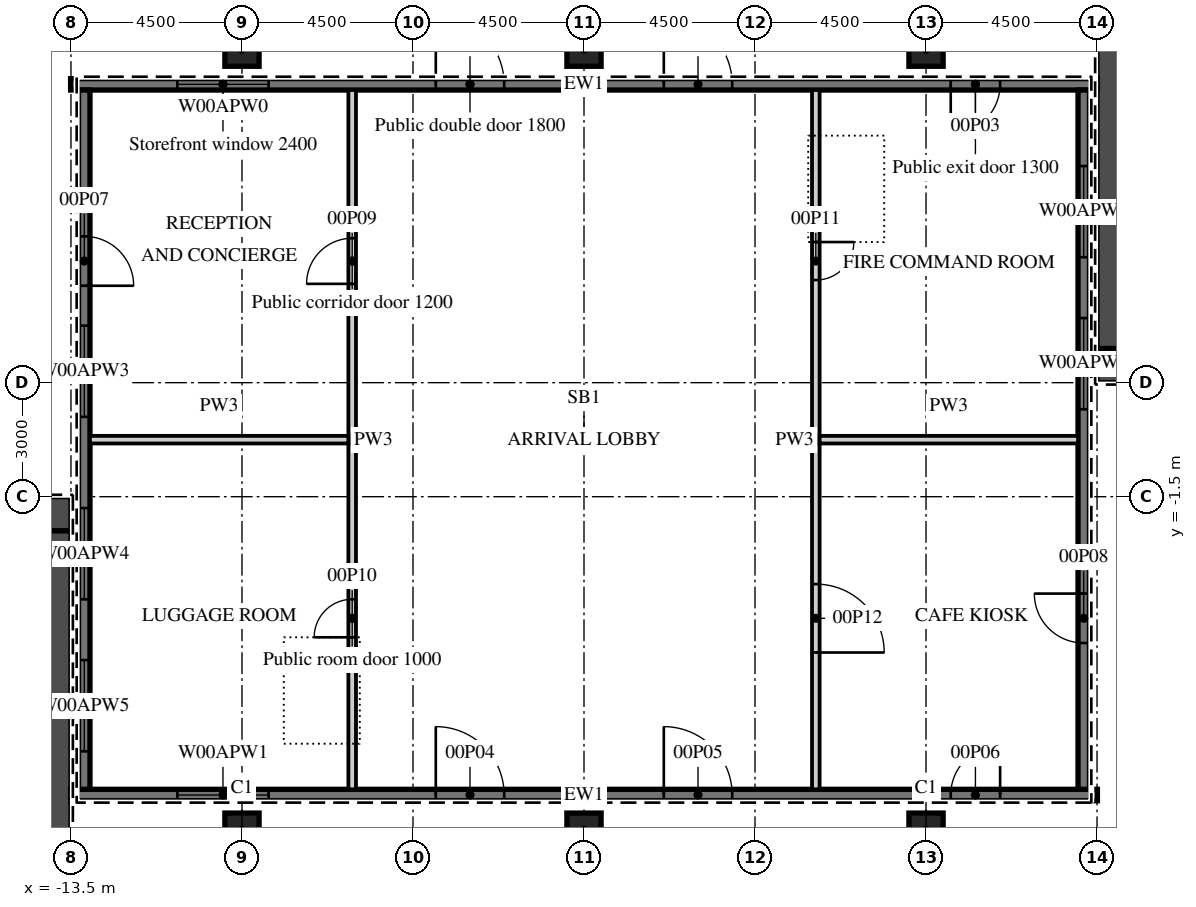
"""IFC4 building model, lengths in metres.
Left out: names, types, materials, properties, quantities, classifications, styles, units other than length and angle.
Written with IfcOpenShell. Run it as: python <this file> out.ifc"""

import sys

from ifc_helpers import new_model, si_unit, direction, frame, frame_2d, origin, origin_2d, place, context, subcontext, project, spatial, rectangle, extrude, element, fill, save


model = new_model("IFC4")
c1 = context("Model", 3, precision=1e-05, world=origin(), true_north=direction((0.0, 1.0)))
c2 = subcontext(c1, "Body", "Model", "MODEL_VIEW")
j1 = project(units=[si_unit("LENGTHUNIT", "METRE"), si_unit("PLANEANGLEUNIT", "RADIAN")], contexts=[c1])
p1 = place(None, origin())
s1 = spatial("IfcSite", under=j1, at=p1, CompositionType="ELEMENT")
p2 = place(p1, origin())
s2 = spatial("IfcBuilding", under=s1, at=p2, CompositionType="ELEMENT")
p3 = place(p2, origin())
s3 = spatial("IfcBuildingStorey", under=s2, at=p3, CompositionType="ELEMENT", Elevation=0.0)
for number, where, z_axis, x_axis in (
    (1, (-9.0, -10.275, -0.5), (0.0, 0.0, 1.0), (1.0, 0.0, 0.0)),
    (2, (-9.0, 10.275, -0.5), (0.0, 0.0, 1.0), (1.0, 0.0, 0.0)),
    (3, (0.0, -10.275, -0.5), (0.0, 0.0, 1.0), (1.0, 0.0, 0.0)),
    (4, (0.0, 10.275, -0.5), (0.0, 0.0, 1.0), (1.0, 0.0, 0.0)),
    (5, (9.0, -10.275, -0.5), (0.0, 0.0, 1.0), (1.0, 0.0, 0.0)),
    (6, (9.0, 10.275, -0.5), (0.0, 0.0, 1.0), (1.0, 0.0, 0.0)),
):
    element("IfcColumn", number, at=place(p3, frame(where, z_axis=z_axis, x_axis=x_axis)), inside=s3, PredefinedType="COLUMN", context=c2, shape_type="SweptSolid", body=[
        extrude(rectangle(XDim=0.9, YDim=0.9, at=origin_2d()), origin(), (0.0, 0.0, 1.0), 11.5),
    ])
p4 = place(p3, frame((-31.5, -1.95, 0.0), z_axis=(0.0, 0.0, 1.0), x_axis=(1.0, 0.0, 0.0)))
e7 = element("IfcWall", 7, at=p4, inside=s3, PredefinedType="SHEAR", context=c2, shape_type="SweptSolid", body=[
    extrude(rectangle(XDim=18.0, YDim=0.9, at=frame_2d((9.0, 0.0))), origin(), (0.0, 0.0, 1.0), 10.55),
])
p5 = place(p4, frame((14.725, 0.0, 0.0)))
e8 = element("IfcOpeningElement", 8, at=p5, cuts=e7, PredefinedType="OPENING", context=c2, shape_type="SweptSolid", body=[
    extrude(rectangle(XDim=1.8, YDim=2.1, at=frame_2d((0.9, 1.05))), frame((0.0, 0.46, 0.0), z_axis=(0.0, -1.0, 0.0), x_axis=(1.0, 0.0, 0.0)), (0.0, 0.0, 1.0), 0.92),
])
p6 = place(p3, frame((-13.95, -14.6, 0.0), z_axis=(0.0, 0.0, 1.0), x_axis=(0.0, 1.0, 0.0)))
e9 = element("IfcWall", 9, at=p6, inside=s3, PredefinedType="SHEAR", context=c2, shape_type="SweptSolid", body=[
    extrude(rectangle(XDim=12.2, YDim=0.9, at=frame_2d((6.1, 0.0))), origin(), (0.0, 0.0, 1.0), 10.55),
])
p7 = place(p3, frame((13.5, 1.95, 0.0), z_axis=(0.0, 0.0, 1.0), x_axis=(1.0, 0.0, 0.0)))
e10 = element("IfcWall", 10, at=p7, inside=s3, PredefinedType="SHEAR", context=c2, shape_type="SweptSolid", body=[
    extrude(rectangle(XDim=18.0, YDim=0.9, at=frame_2d((9.0, 0.0))), origin(), (0.0, 0.0, 1.0), 10.55),
])
p8 = place(p7, frame((1.475, 0.0, 0.0)))
e11 = element("IfcOpeningElement", 11, at=p8, cuts=e10, PredefinedType="OPENING", context=c2, shape_type="SweptSolid", body=[
    extrude(rectangle(XDim=1.8, YDim=2.1, at=frame_2d((0.9, 1.05))), frame((0.0, 0.46, 0.0), z_axis=(0.0, -1.0, 0.0), x_axis=(1.0, 0.0, 0.0)), (0.0, 0.0, 1.0), 0.92),
])
p9 = place(p3, frame((13.95, 2.4, 0.0), z_axis=(0.0, 0.0, 1.0), x_axis=(0.0, 1.0, 0.0)))
e12 = element("IfcWall", 12, at=p9, inside=s3, PredefinedType="SHEAR", context=c2, shape_type="SweptSolid", body=[
    extrude(rectangle(XDim=12.2, YDim=0.9, at=frame_2d((6.1, 0.0))), origin(), (0.0, 0.0, 1.0), 10.55),
])
p10 = place(p3, frame((-13.51, 9.35, 0.0), z_axis=(0.0, 0.0, 1.0), x_axis=(1.0, 0.0, 0.0)))
e13 = element("IfcWall", 13, at=p10, inside=s3, PredefinedType="SOLIDWALL", context=c2, shape_type="SweptSolid", body=[
    extrude(rectangle(XDim=27.02, YDim=0.3, at=frame_2d((13.51, 0.0))), origin(), (0.0, 0.0, 1.0), 10.55),
])
p11 = place(p10, frame((9.61, 0.0, 0.0)))
e14 = element("IfcOpeningElement", 14, at=p11, cuts=e13, PredefinedType="OPENING", context=c2, shape_type="SweptSolid", body=[
    extrude(rectangle(XDim=1.8, YDim=2.1, at=frame_2d((0.9, 1.05))), frame((0.0, 0.16, 0.0), z_axis=(0.0, -1.0, 0.0), x_axis=(1.0, 0.0, 0.0)), (0.0, 0.0, 1.0), 0.32),
])
p12 = place(p10, frame((15.61, 0.0, 0.0)))
e15 = element("IfcOpeningElement", 15, at=p12, cuts=e13, PredefinedType="OPENING", context=c2, shape_type="SweptSolid", body=[
    extrude(rectangle(XDim=1.8, YDim=2.1, at=frame_2d((0.9, 1.05))), frame((0.0, 0.16, 0.0), z_axis=(0.0, -1.0, 0.0), x_axis=(1.0, 0.0, 0.0)), (0.0, 0.0, 1.0), 0.32),
])
p13 = place(p10, frame((23.16, 0.0, 0.0)))
e16 = element("IfcOpeningElement", 16, at=p13, cuts=e13, PredefinedType="OPENING", context=c2, shape_type="SweptSolid", body=[
    extrude(rectangle(XDim=1.3, YDim=2.1, at=frame_2d((0.65, 1.05))), frame((0.0, 0.16, 0.0), z_axis=(0.0, -1.0, 0.0), x_axis=(1.0, 0.0, 0.0)), (0.0, 0.0, 1.0), 0.32),
])
p14 = place(p10, frame((2.81, 0.0, 0.2)))
e17 = element("IfcOpeningElement", 17, at=p14, cuts=e13, PredefinedType="OPENING", context=c2, shape_type="SweptSolid", body=[
    extrude(rectangle(XDim=2.4, YDim=3.2, at=frame_2d((1.2, 1.6))), frame((0.0, 0.16, 0.0), z_axis=(0.0, -1.0, 0.0), x_axis=(1.0, 0.0, 0.0)), (0.0, 0.0, 1.0), 0.32),
])
p15 = place(p3, frame((-13.51, -9.35, 0.0), z_axis=(0.0, 0.0, 1.0), x_axis=(1.0, 0.0, 0.0)))
e18 = element("IfcWall", 18, at=p15, inside=s3, PredefinedType="SOLIDWALL", context=c2, shape_type="SweptSolid", body=[
    extrude(rectangle(XDim=27.02, YDim=0.3, at=frame_2d((13.51, 0.0))), origin(), (0.0, 0.0, 1.0), 10.55),
])
p16 = place(p15, frame((9.61, 0.0, 0.0)))
e19 = element("IfcOpeningElement", 19, at=p16, cuts=e18, PredefinedType="OPENING", context=c2, shape_type="SweptSolid", body=[
    extrude(rectangle(XDim=1.8, YDim=2.1, at=frame_2d((0.9, 1.05))), frame((0.0, 0.16, 0.0), z_axis=(0.0, -1.0, 0.0), x_axis=(1.0, 0.0, 0.0)), (0.0, 0.0, 1.0), 0.32),
])
p17 = place(p15, frame((15.61, 0.0, 0.0)))
e20 = element("IfcOpeningElement", 20, at=p17, cuts=e18, PredefinedType="OPENING", context=c2, shape_type="SweptSolid", body=[
    extrude(rectangle(XDim=1.8, YDim=2.1, at=frame_2d((0.9, 1.05))), frame((0.0, 0.16, 0.0), z_axis=(0.0, -1.0, 0.0), x_axis=(1.0, 0.0, 0.0)), (0.0, 0.0, 1.0), 0.32),
])
p18 = place(p15, frame((23.16, 0.0, 0.0)))
e21 = element("IfcOpeningElement", 21, at=p18, cuts=e18, PredefinedType="OPENING", context=c2, shape_type="SweptSolid", body=[
    extrude(rectangle(XDim=1.3, YDim=2.1, at=frame_2d((0.65, 1.05))), frame((0.0, 0.16, 0.0), z_axis=(0.0, -1.0, 0.0), x_axis=(1.0, 0.0, 0.0)), (0.0, 0.0, 1.0), 0.32),
])
p19 = place(p15, frame((2.81, 0.0, 0.2)))
e22 = element("IfcOpeningElement", 22, at=p19, cuts=e18, PredefinedType="OPENING", context=c2, shape_type="SweptSolid", body=[
    extrude(rectangle(XDim=2.4, YDim=3.2, at=frame_2d((1.2, 1.6))), frame((0.0, 0.16, 0.0), z_axis=(0.0, -1.0, 0.0), x_axis=(1.0, 0.0, 0.0)), (0.0, 0.0, 1.0), 0.32),
])
p20 = place(p3, frame((-13.15, -9.2, 0.0), z_axis=(0.0, 0.0, 1.0), x_axis=(0.0, 1.0, 0.0)))
e23 = element("IfcWall", 23, at=p20, inside=s3, PredefinedType="SOLIDWALL", context=c2, shape_type="SweptSolid", body=[
    extrude(rectangle(XDim=18.4, YDim=0.3, at=frame_2d((9.2, 0.0))), origin(), (0.0, 0.0, 1.0), 10.55),
])
p21 = place(p20, frame((13.25, 0.0, 0.0)))
e24 = element("IfcOpeningElement", 24, at=p21, cuts=e23, PredefinedType="OPENING", context=c2, shape_type="SweptSolid", body=[
    extrude(rectangle(XDim=1.3, YDim=2.1, at=frame_2d((0.65, 1.05))), frame((0.0, 0.16, 0.0), z_axis=(0.0, -1.0, 0.0), x_axis=(1.0, 0.0, 0.0)), (0.0, 0.0, 1.0), 0.32),
])
p22 = place(p20, frame((9.8, 0.0, 0.2)))
e25 = element("IfcOpeningElement", 25, at=p22, cuts=e23, PredefinedType="OPENING", context=c2, shape_type="SweptSolid", body=[
    extrude(rectangle(XDim=2.4, YDim=3.2, at=frame_2d((1.2, 1.6))), frame((0.0, 0.16, 0.0), z_axis=(0.0, -1.0, 0.0), x_axis=(1.0, 0.0, 0.0)), (0.0, 0.0, 1.0), 0.32),
])
p23 = place(p20, frame((5.0, 0.0, 0.2)))
e26 = element("IfcOpeningElement", 26, at=p23, cuts=e23, PredefinedType="OPENING", context=c2, shape_type="SweptSolid", body=[
    extrude(rectangle(XDim=2.4, YDim=3.2, at=frame_2d((1.2, 1.6))), frame((0.0, 0.16, 0.0), z_axis=(0.0, -1.0, 0.0), x_axis=(1.0, 0.0, 0.0)), (0.0, 0.0, 1.0), 0.32),
])
p24 = place(p20, frame((1.0, 0.0, 0.2)))
e27 = element("IfcOpeningElement", 27, at=p24, cuts=e23, PredefinedType="OPENING", context=c2, shape_type="SweptSolid", body=[
    extrude(rectangle(XDim=2.4, YDim=3.2, at=frame_2d((1.2, 1.6))), frame((0.0, 0.16, 0.0), z_axis=(0.0, -1.0, 0.0), x_axis=(1.0, 0.0, 0.0)), (0.0, 0.0, 1.0), 0.32),
])
p25 = place(p3, frame((13.15, -9.2, 0.0), z_axis=(0.0, 0.0, 1.0), x_axis=(0.0, 1.0, 0.0)))
e28 = element("IfcWall", 28, at=p25, inside=s3, PredefinedType="SOLIDWALL", context=c2, shape_type="SweptSolid", body=[
    extrude(rectangle(XDim=18.4, YDim=0.3, at=frame_2d((9.2, 0.0))), origin(), (0.0, 0.0, 1.0), 10.55),
])
p26 = place(p25, frame((3.85, 0.0, 0.0)))
e29 = element("IfcOpeningElement", 29, at=p26, cuts=e28, PredefinedType="OPENING", context=c2, shape_type="SweptSolid", body=[
    extrude(rectangle(XDim=1.3, YDim=2.1, at=frame_2d((0.65, 1.05))), frame((0.0, 0.16, 0.0), z_axis=(0.0, -1.0, 0.0), x_axis=(1.0, 0.0, 0.0)), (0.0, 0.0, 1.0), 0.32),
])
p27 = place(p25, frame((14.0, 0.0, 0.2)))
e30 = element("IfcOpeningElement", 30, at=p27, cuts=e28, PredefinedType="OPENING", context=c2, shape_type="SweptSolid", body=[
    extrude(rectangle(XDim=2.4, YDim=3.2, at=frame_2d((1.2, 1.6))), frame((0.0, 0.16, 0.0), z_axis=(0.0, -1.0, 0.0), x_axis=(1.0, 0.0, 0.0)), (0.0, 0.0, 1.0), 0.32),
])
p28 = place(p25, frame((10.0, 0.0, 0.2)))
e31 = element("IfcOpeningElement", 31, at=p28, cuts=e28, PredefinedType="OPENING", context=c2, shape_type="SweptSolid", body=[
    extrude(rectangle(XDim=2.4, YDim=3.2, at=frame_2d((1.2, 1.6))), frame((0.0, 0.16, 0.0), z_axis=(0.0, -1.0, 0.0), x_axis=(1.0, 0.0, 0.0)), (0.0, 0.0, 1.0), 0.32),
])
p29 = place(p3, frame((-6.1, -9.2, 0.0), z_axis=(0.0, 0.0, 1.0), x_axis=(0.0, 1.0, 0.0)))
e32 = element("IfcWall", 32, at=p29, inside=s3, PredefinedType="PARTITIONING", context=c2, shape_type="SweptSolid", body=[
    extrude(rectangle(XDim=18.4, YDim=0.2, at=frame_2d((9.2, 0.0))), origin(), (0.0, 0.0, 1.0), 10.55),
])
p30 = place(p29, frame((13.3, 0.0, 0.0)))
e33 = element("IfcOpeningElement", 33, at=p30, cuts=e32, PredefinedType="OPENING", context=c2, shape_type="SweptSolid", body=[
    extrude(rectangle(XDim=1.2, YDim=2.1, at=frame_2d((0.6, 1.05))), frame((0.0, 0.11, 0.0), z_axis=(0.0, -1.0, 0.0), x_axis=(1.0, 0.0, 0.0)), (0.0, 0.0, 1.0), 0.22),
])
p31 = place(p29, frame((4.0, 0.0, 0.0)))
e34 = element("IfcOpeningElement", 34, at=p31, cuts=e32, PredefinedType="OPENING", context=c2, shape_type="SweptSolid", body=[
    extrude(rectangle(XDim=1.0, YDim=2.1, at=frame_2d((0.5, 1.05))), frame((0.0, 0.11, 0.0), z_axis=(0.0, -1.0, 0.0), x_axis=(1.0, 0.0, 0.0)), (0.0, 0.0, 1.0), 0.22),
])
p32 = place(p3, frame((6.1, -9.2, 0.0), z_axis=(0.0, 0.0, 1.0), x_axis=(0.0, 1.0, 0.0)))
e35 = element("IfcWall", 35, at=p32, inside=s3, PredefinedType="PARTITIONING", context=c2, shape_type="SweptSolid", body=[
    extrude(rectangle(XDim=18.4, YDim=0.2, at=frame_2d((9.2, 0.0))), origin(), (0.0, 0.0, 1.0), 10.55),
])
p33 = place(p32, frame((13.4, 0.0, 0.0)))
e36 = element("IfcOpeningElement", 36, at=p33, cuts=e35, PredefinedType="OPENING", context=c2, shape_type="SweptSolid", body=[
    extrude(rectangle(XDim=1.0, YDim=2.1, at=frame_2d((0.5, 1.05))), frame((0.0, 0.11, 0.0), z_axis=(0.0, -1.0, 0.0), x_axis=(1.0, 0.0, 0.0)), (0.0, 0.0, 1.0), 0.22),
])
p34 = place(p32, frame((3.6, 0.0, 0.0)))
e37 = element("IfcOpeningElement", 37, at=p34, cuts=e35, PredefinedType="OPENING", context=c2, shape_type="SweptSolid", body=[
    extrude(rectangle(XDim=1.8, YDim=2.1, at=frame_2d((0.9, 1.05))), frame((0.0, 0.11, 0.0), z_axis=(0.0, -1.0, 0.0), x_axis=(1.0, 0.0, 0.0)), (0.0, 0.0, 1.0), 0.22),
])
for number, where, z_axis, x_axis in (
    (38, (-13.0, 0.0, 0.0), (0.0, 0.0, 1.0), (1.0, 0.0, 0.0)),
    (39, (6.2, 0.0, 0.0), (0.0, 0.0, 1.0), (1.0, 0.0, 0.0)),
):
    element("IfcWall", number, at=place(p3, frame(where, z_axis=z_axis, x_axis=x_axis)), inside=s3, PredefinedType="PARTITIONING", context=c2, shape_type="SweptSolid", body=[
        extrude(rectangle(XDim=6.8, YDim=0.2, at=frame_2d((3.4, 0.0))), origin(), (0.0, 0.0, 1.0), 10.55),
    ])
p35 = place(p11, origin())
e40 = element("IfcDoor", 40, at=p35, inside=s3, OperationType="DOUBLE_DOOR_DOUBLE_SWING", PredefinedType="DOOR", context=c2, shape_type="SweptSolid", body=[
    extrude(rectangle(XDim=1.8, YDim=2.1, at=frame_2d((0.9, 1.05))), frame((0.0, 0.025, 0.0), z_axis=(0.0, -1.0, 0.0), x_axis=(1.0, 0.0, 0.0)), (0.0, 0.0, 1.0), 0.05),
])
fill(e14, e40)
p36 = place(p12, origin())
e41 = element("IfcDoor", 41, at=p36, inside=s3, OperationType="DOUBLE_DOOR_DOUBLE_SWING", PredefinedType="DOOR", context=c2, shape_type="SweptSolid", body=[
    extrude(rectangle(XDim=1.8, YDim=2.1, at=frame_2d((0.9, 1.05))), frame((0.0, 0.025, 0.0), z_axis=(0.0, -1.0, 0.0), x_axis=(1.0, 0.0, 0.0)), (0.0, 0.0, 1.0), 0.05),
])
fill(e15, e41)
p37 = place(p13, origin())
e42 = element("IfcDoor", 42, at=p37, inside=s3, OperationType="SINGLE_SWING_LEFT", PredefinedType="DOOR", context=c2, shape_type="SweptSolid", body=[
    extrude(rectangle(XDim=1.3, YDim=2.1, at=frame_2d((0.65, 1.05))), frame((0.0, 0.025, 0.0), z_axis=(0.0, -1.0, 0.0), x_axis=(1.0, 0.0, 0.0)), (0.0, 0.0, 1.0), 0.05),
])
fill(e16, e42)
p38 = place(p16, origin())
e43 = element("IfcDoor", 43, at=p38, inside=s3, OperationType="DOUBLE_DOOR_DOUBLE_SWING", PredefinedType="DOOR", context=c2, shape_type="SweptSolid", body=[
    extrude(rectangle(XDim=1.8, YDim=2.1, at=frame_2d((0.9, 1.05))), frame((0.0, 0.025, 0.0), z_axis=(0.0, -1.0, 0.0), x_axis=(1.0, 0.0, 0.0)), (0.0, 0.0, 1.0), 0.05),
])
fill(e19, e43)
p39 = place(p17, origin())
e44 = element("IfcDoor", 44, at=p39, inside=s3, OperationType="DOUBLE_DOOR_DOUBLE_SWING", PredefinedType="DOOR", context=c2, shape_type="SweptSolid", body=[
    extrude(rectangle(XDim=1.8, YDim=2.1, at=frame_2d((0.9, 1.05))), frame((0.0, 0.025, 0.0), z_axis=(0.0, -1.0, 0.0), x_axis=(1.0, 0.0, 0.0)), (0.0, 0.0, 1.0), 0.05),
])
fill(e20, e44)
p40 = place(p18, origin())
e45 = element("IfcDoor", 45, at=p40, inside=s3, OperationType="SINGLE_SWING_RIGHT", PredefinedType="DOOR", context=c2, shape_type="SweptSolid", body=[
    extrude(rectangle(XDim=1.3, YDim=2.1, at=frame_2d((0.65, 1.05))), frame((0.0, 0.025, 0.0), z_axis=(0.0, -1.0, 0.0), x_axis=(1.0, 0.0, 0.0)), (0.0, 0.0, 1.0), 0.05),
])
fill(e21, e45)
p41 = place(p21, origin())
e46 = element("IfcDoor", 46, at=p41, inside=s3, OperationType="SINGLE_SWING_LEFT", PredefinedType="DOOR", context=c2, shape_type="SweptSolid", body=[
    extrude(rectangle(XDim=1.3, YDim=2.1, at=frame_2d((0.65, 1.05))), frame((0.0, 0.025, 0.0), z_axis=(0.0, -1.0, 0.0), x_axis=(1.0, 0.0, 0.0)), (0.0, 0.0, 1.0), 0.05),
])
fill(e24, e46)
p42 = place(p26, origin())
e47 = element("IfcDoor", 47, at=p42, inside=s3, OperationType="SINGLE_SWING_RIGHT", PredefinedType="DOOR", context=c2, shape_type="SweptSolid", body=[
    extrude(rectangle(XDim=1.3, YDim=2.1, at=frame_2d((0.65, 1.05))), frame((0.0, 0.025, 0.0), z_axis=(0.0, -1.0, 0.0), x_axis=(1.0, 0.0, 0.0)), (0.0, 0.0, 1.0), 0.05),
])
fill(e29, e47)
p43 = place(p30, origin())
e48 = element("IfcDoor", 48, at=p43, inside=s3, OperationType="SINGLE_SWING_LEFT", PredefinedType="DOOR", context=c2, shape_type="SweptSolid", body=[
    extrude(rectangle(XDim=1.2, YDim=2.1, at=frame_2d((0.6, 1.05))), frame((0.0, 0.025, 0.0), z_axis=(0.0, -1.0, 0.0), x_axis=(1.0, 0.0, 0.0)), (0.0, 0.0, 1.0), 0.05),
])
fill(e33, e48)
p44 = place(p31, origin())
e49 = element("IfcDoor", 49, at=p44, inside=s3, OperationType="SINGLE_SWING_LEFT", PredefinedType="DOOR", context=c2, shape_type="SweptSolid", body=[
    extrude(rectangle(XDim=1.0, YDim=2.1, at=frame_2d((0.5, 1.05))), frame((0.0, 0.025, 0.0), z_axis=(0.0, -1.0, 0.0), x_axis=(1.0, 0.0, 0.0)), (0.0, 0.0, 1.0), 0.05),
])
fill(e34, e49)
p45 = place(p33, origin())
e50 = element("IfcDoor", 50, at=p45, inside=s3, OperationType="SINGLE_SWING_RIGHT", PredefinedType="DOOR", context=c2, shape_type="SweptSolid", body=[
    extrude(rectangle(XDim=1.0, YDim=2.1, at=frame_2d((0.5, 1.05))), frame((0.0, 0.025, 0.0), z_axis=(0.0, -1.0, 0.0), x_axis=(1.0, 0.0, 0.0)), (0.0, 0.0, 1.0), 0.05),
])
fill(e36, e50)
p46 = place(p34, origin())
e51 = element("IfcDoor", 51, at=p46, inside=s3, OperationType="DOUBLE_DOOR_DOUBLE_SWING", PredefinedType="DOOR", context=c2, shape_type="SweptSolid", body=[
    extrude(rectangle(XDim=1.8, YDim=2.1, at=frame_2d((0.9, 1.05))), frame((0.0, 0.025, 0.0), z_axis=(0.0, -1.0, 0.0), x_axis=(1.0, 0.0, 0.0)), (0.0, 0.0, 1.0), 0.05),
])
fill(e37, e51)
p47 = place(p14, origin())
e52 = element("IfcWindow", 52, at=p47, inside=s3, PartitioningType="SINGLE_PANEL", PredefinedType="WINDOW", context=c2, shape_type="SweptSolid", body=[
    extrude(rectangle(XDim=2.4, YDim=3.2, at=frame_2d((1.2, 1.6))), frame((0.0, 0.03, 0.0), z_axis=(0.0, -1.0, 0.0), x_axis=(1.0, 0.0, 0.0)), (0.0, 0.0, 1.0), 0.06),
])
fill(e17, e52)
p48 = place(p19, origin())
e53 = element("IfcWindow", 53, at=p48, inside=s3, PartitioningType="SINGLE_PANEL", PredefinedType="WINDOW", context=c2, shape_type="SweptSolid", body=[
    extrude(rectangle(XDim=2.4, YDim=3.2, at=frame_2d((1.2, 1.6))), frame((0.0, 0.03, 0.0), z_axis=(0.0, -1.0, 0.0), x_axis=(1.0, 0.0, 0.0)), (0.0, 0.0, 1.0), 0.06),
])
fill(e22, e53)
p49 = place(p22, origin())
e54 = element("IfcWindow", 54, at=p49, inside=s3, PartitioningType="SINGLE_PANEL", PredefinedType="WINDOW", context=c2, shape_type="SweptSolid", body=[
    extrude(rectangle(XDim=2.4, YDim=3.2, at=frame_2d((1.2, 1.6))), frame((0.0, 0.03, 0.0), z_axis=(0.0, -1.0, 0.0), x_axis=(1.0, 0.0, 0.0)), (0.0, 0.0, 1.0), 0.06),
])
fill(e25, e54)
p50 = place(p23, origin())
e55 = element("IfcWindow", 55, at=p50, inside=s3, PartitioningType="SINGLE_PANEL", PredefinedType="WINDOW", context=c2, shape_type="SweptSolid", body=[
    extrude(rectangle(XDim=2.4, YDim=3.2, at=frame_2d((1.2, 1.6))), frame((0.0, 0.03, 0.0), z_axis=(0.0, -1.0, 0.0), x_axis=(1.0, 0.0, 0.0)), (0.0, 0.0, 1.0), 0.06),
])
fill(e26, e55)
p51 = place(p24, origin())
e56 = element("IfcWindow", 56, at=p51, inside=s3, PartitioningType="SINGLE_PANEL", PredefinedType="WINDOW", context=c2, shape_type="SweptSolid", body=[
    extrude(rectangle(XDim=2.4, YDim=3.2, at=frame_2d((1.2, 1.6))), frame((0.0, 0.03, 0.0), z_axis=(0.0, -1.0, 0.0), x_axis=(1.0, 0.0, 0.0)), (0.0, 0.0, 1.0), 0.06),
])
fill(e27, e56)
p52 = place(p27, origin())
e57 = element("IfcWindow", 57, at=p52, inside=s3, PartitioningType="SINGLE_PANEL", PredefinedType="WINDOW", context=c2, shape_type="SweptSolid", body=[
    extrude(rectangle(XDim=2.4, YDim=3.2, at=frame_2d((1.2, 1.6))), frame((0.0, 0.03, 0.0), z_axis=(0.0, -1.0, 0.0), x_axis=(1.0, 0.0, 0.0)), (0.0, 0.0, 1.0), 0.06),
])
fill(e30, e57)
p53 = place(p28, origin())
e58 = element("IfcWindow", 58, at=p53, inside=s3, PartitioningType="SINGLE_PANEL", PredefinedType="WINDOW", context=c2, shape_type="SweptSolid", body=[
    extrude(rectangle(XDim=2.4, YDim=3.2, at=frame_2d((1.2, 1.6))), frame((0.0, 0.03, 0.0), z_axis=(0.0, -1.0, 0.0), x_axis=(1.0, 0.0, 0.0)), (0.0, 0.0, 1.0), 0.06),
])
fill(e31, e58)
save(model, sys.argv[1])
